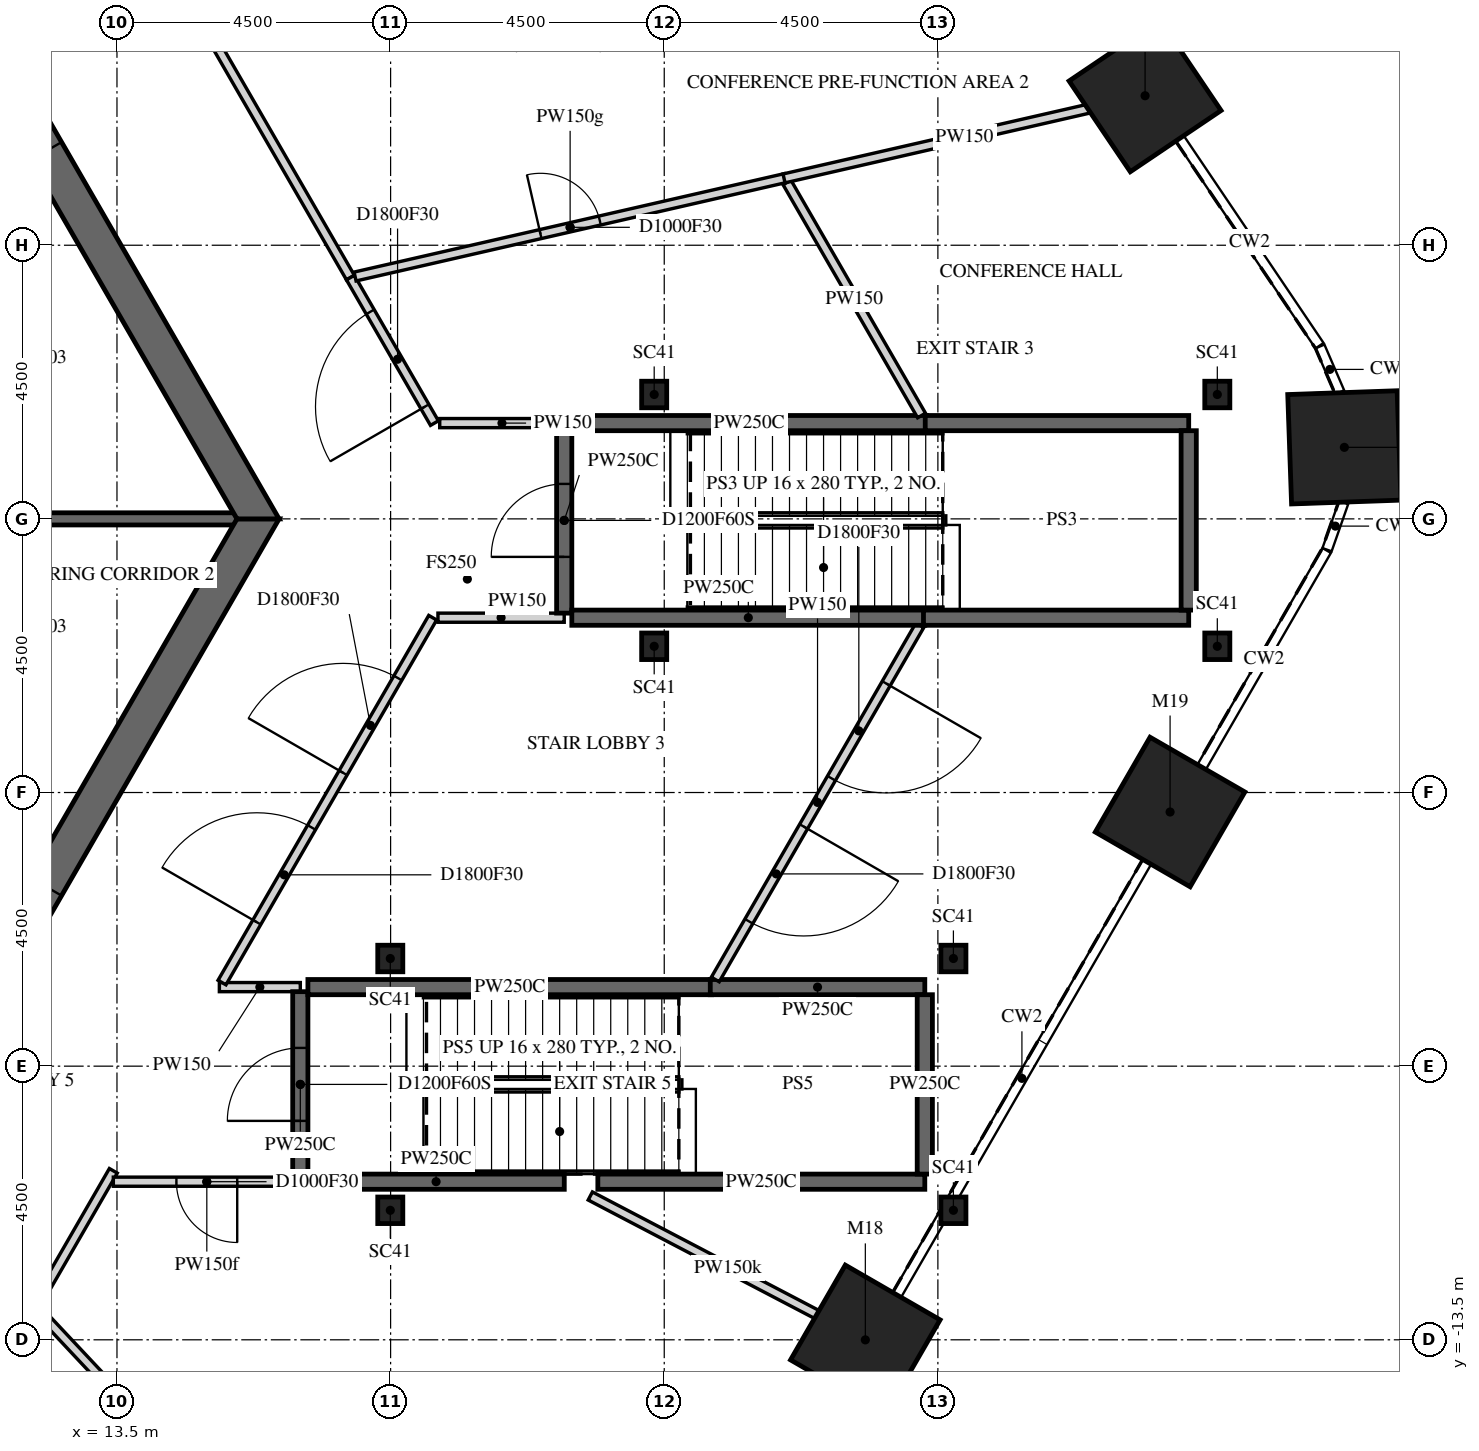
"""IFC4 building model, lengths in metres.
Left out: names, types, materials, properties, quantities, classifications, styles, units other than length and angle.
Written with IfcOpenShell. Run it as: python <this file> out.ifc"""

import sys

from ifc_helpers import new_model, si_unit, direction, frame, frame_2d, origin, origin_2d, place, context, subcontext, project, spatial, polyline, rectangle, i_section, outline, extrude, element, fill, save


model = new_model("IFC4")
c1 = context("Model", 3, precision=1e-05, world=origin(), true_north=direction((0.0, 1.0)))
c2 = subcontext(c1, "Body", "Model", "MODEL_VIEW")
j1 = project(units=[si_unit("LENGTHUNIT", "METRE"), si_unit("PLANEANGLEUNIT", "RADIAN")], contexts=[c1])
p1 = place(None, origin())
s1 = spatial("IfcSite", under=j1, at=p1, CompositionType="ELEMENT")
p2 = place(p1, origin())
s2 = spatial("IfcBuilding", under=s1, at=p2, CompositionType="ELEMENT")
p3 = place(p2, frame((0.0, 0.0, 20.5)))
s3 = spatial("IfcBuildingStorey", under=s2, at=p3, CompositionType="ELEMENT", Elevation=20.5)
for number, where, z_axis, x_axis in (
    (1, (25.807, -13.501, -0.25), (0.0, 0.0, 1.0), (-0.5, -0.866, 0.0)),
    (2, (30.819, -4.82, -0.25), (0.0, 0.0, 1.0), (-0.5, -0.866, 0.0)),
    (3, (33.685, 1.176, -0.25), (0.0, 0.0, 1.0), (0.035, -0.999, 0.0)),
    (4, (30.407, 6.958, -0.25), (0.0, 0.0, 1.0), (0.559, -0.829, 0.0)),
):
    element("IfcColumn", number, at=place(p3, frame(where, z_axis=z_axis, x_axis=x_axis)), inside=s3, PredefinedType="COLUMN", context=c2, shape_type="SweptSolid", body=[
        extrude(rectangle(XDim=1.8, YDim=1.8, at=origin_2d()), origin(), (0.0, 0.0, 1.0), 5.5),
    ])
for number, where, z_axis, x_axis in (
    (5, (31.595, 2.045, -0.25), (0.0, 0.0, 1.0), (1.0, 0.0, 0.0)),
    (6, (31.595, -2.095, -0.25), (0.0, 0.0, 1.0), (1.0, 0.0, 0.0)),
    (7, (22.335, -2.095, -0.25), (0.0, 0.0, 1.0), (1.0, 0.0, 0.0)),
    (8, (22.335, 2.045, -0.25), (0.0, 0.0, 1.0), (1.0, 0.0, 0.0)),
    (9, (27.255, -7.23, -0.25), (0.0, 0.0, 1.0), (1.0, 0.0, 0.0)),
    (10, (27.255, -11.37, -0.25), (0.0, 0.0, 1.0), (1.0, 0.0, 0.0)),
    (11, (17.995, -11.37, -0.25), (0.0, 0.0, 1.0), (1.0, 0.0, 0.0)),
    (12, (17.995, -7.23, -0.25), (0.0, 0.0, 1.0), (1.0, 0.0, 0.0)),
):
    element("IfcColumn", number, at=place(p3, frame(where, z_axis=z_axis, x_axis=x_axis)), inside=s3, PredefinedType="COLUMN", context=c2, shape_type="SweptSolid", body=[
        extrude(i_section(OverallWidth=0.412, OverallDepth=0.437, WebThickness=0.036, FlangeThickness=0.058, FilletRadius=0.015, at=origin_2d()), origin(), (0.0, 0.0, 1.0), 5.5),
    ])
p4 = place(p3, frame((7.91, -13.7, -0.25), z_axis=(0.0, 0.0, 1.0), x_axis=(0.499999880136, 0.866025472988, 0.0)))
e13 = element("IfcWall", 13, at=p4, inside=s3, PredefinedType="SHEAR", context=c2, shape_type="SweptSolid", body=[
    extrude(outline(polyline([(-0.173, -0.3), (15.993, -0.3), (15.646, 0.3), (0.173, 0.3), (-0.173, -0.3)])), origin(), (0.0, 0.0, 1.0), 5.5),
])
p5 = place(p4, frame((7.039, 0.0, 0.25)))
e14 = element("IfcOpeningElement", 14, at=p5, cuts=e13, PredefinedType="OPENING", context=c2, shape_type="SweptSolid", body=[
    extrude(rectangle(XDim=1.8, YDim=2.4, at=frame_2d((0.9, 1.2))), frame((0.0, 0.31, 0.0), z_axis=(0.0, -1.0, 0.0), x_axis=(1.0, 0.0, 0.0)), (0.0, 0.0, 1.0), 0.62),
])
p6 = place(p3, frame((15.819, 0.0, -0.25), z_axis=(0.0, 0.0, 1.0), x_axis=(-0.499999880136, 0.866025472988, 0.0)))
e15 = element("IfcWall", 15, at=p6, inside=s3, PredefinedType="SHEAR", context=c2, shape_type="SweptSolid", body=[
    extrude(outline(polyline([(-0.173, -0.3), (15.993, -0.3), (15.646, 0.3), (0.173, 0.3), (-0.173, -0.3)])), origin(), (0.0, 0.0, 1.0), 5.5),
])
p7 = place(p6, frame((6.981, 0.0, 0.25)))
e16 = element("IfcOpeningElement", 16, at=p7, cuts=e15, PredefinedType="OPENING", context=c2, shape_type="SweptSolid", body=[
    extrude(rectangle(XDim=1.8, YDim=2.4, at=frame_2d((0.9, 1.2))), frame((0.0, 0.31, 0.0), z_axis=(0.0, -1.0, 0.0), x_axis=(1.0, 0.0, 0.0)), (0.0, 0.0, 1.0), 0.62),
])
p8 = place(p3, frame((11.547, 0.0, -0.25), z_axis=(0.0, 0.0, 1.0), x_axis=(1.0, 0.0, 0.0)))
e17 = element("IfcWall", 17, at=p8, inside=s3, PredefinedType="SHEAR", context=c2, shape_type="SweptSolid", body=[
    extrude(rectangle(XDim=3.926, YDim=0.2, at=frame_2d((1.963, 0.0))), origin(), (0.0, 0.0, 1.0), 5.5),
])
p9 = place(p3, frame((12.148, -12.959, 0.0), z_axis=(0.0, 0.0, 1.0), x_axis=(0.499959617396, 0.866048717436, 0.0)))
e18 = element("IfcWall", 18, at=p9, inside=s3, PredefinedType="PARTITIONING", context=c2, shape_type="SweptSolid", body=[
    extrude(rectangle(XDim=2.584, YDim=0.15, at=frame_2d((1.292, 0.0))), origin(), (0.0, 0.0, 1.0), 5.25),
])
p10 = place(p3, frame((15.184, -7.7, 0.0), z_axis=(0.0, 0.0, 1.0), x_axis=(1.0, 0.0, 0.0)))
e19 = element("IfcWall", 19, at=p10, inside=s3, PredefinedType="PARTITIONING", context=c2, shape_type="SweptSolid", body=[
    extrude(rectangle(XDim=1.331, YDim=0.15, at=frame_2d((0.666, 0.0))), origin(), (0.0, 0.0, 1.0), 5.25),
])
p11 = place(p3, frame((15.227, -7.625, 0.0), z_axis=(0.0, 0.0, 1.0), x_axis=(0.500053906551, 0.865994278585, 0.0)))
e20 = element("IfcWall", 20, at=p11, inside=s3, PredefinedType="PARTITIONING", context=c2, shape_type="SweptSolid", body=[
    extrude(rectangle(XDim=6.928, YDim=0.15, at=frame_2d((3.464, 0.0))), origin(), (0.0, 0.0, 1.0), 5.25),
])
p12 = place(p11, frame((1.146, 0.0, 0.0)))
e21 = element("IfcOpeningElement", 21, at=p12, cuts=e20, PredefinedType="OPENING", context=c2, shape_type="SweptSolid", body=[
    extrude(rectangle(XDim=1.8, YDim=2.1, at=frame_2d((0.9, 1.05))), frame((0.0, 0.085, 0.0), z_axis=(0.0, -1.0, 0.0), x_axis=(1.0, 0.0, 0.0)), (0.0, 0.0, 1.0), 0.17),
])
p13 = place(p11, frame((3.983, 0.0, 0.0)))
e22 = element("IfcOpeningElement", 22, at=p13, cuts=e20, PredefinedType="OPENING", context=c2, shape_type="SweptSolid", body=[
    extrude(rectangle(XDim=1.8, YDim=2.1, at=frame_2d((0.9, 1.05))), frame((0.0, 0.085, 0.0), z_axis=(0.0, -1.0, 0.0), x_axis=(1.0, 0.0, 0.0)), (0.0, 0.0, 1.0), 0.17),
])
p14 = place(p3, frame((16.515, -10.9, 0.0), z_axis=(0.0, 0.0, 1.0), x_axis=(-1.0, 0.0, 0.0)))
e23 = element("IfcWall", 23, at=p14, inside=s3, PredefinedType="PARTITIONING", context=c2, shape_type="SweptSolid", body=[
    extrude(rectangle(XDim=3.075, YDim=0.15, at=frame_2d((1.538, 0.0))), origin(), (0.0, 0.0, 1.0), 4.496),
])
p15 = place(p14, frame((1.038, 0.0, 0.0)))
e24 = element("IfcOpeningElement", 24, at=p15, cuts=e23, PredefinedType="OPENING", context=c2, shape_type="SweptSolid", body=[
    extrude(rectangle(XDim=1.0, YDim=2.1, at=frame_2d((0.5, 1.05))), frame((0.0, 0.085, 0.0), z_axis=(0.0, -1.0, 0.0), x_axis=(1.0, 0.0, 0.0)), (0.0, 0.0, 1.0), 0.17),
])
p16 = place(p3, frame((16.515, -10.825, 0.0), z_axis=(0.0, 0.0, 1.0), x_axis=(0.0, 1.0, 0.0)))
e25 = element("IfcWall", 25, at=p16, inside=s3, PredefinedType="PARTITIONING", context=c2, shape_type="SweptSolid", body=[
    extrude(rectangle(XDim=3.05, YDim=0.25, at=frame_2d((1.525, 0.0))), origin(), (0.0, 0.0, 1.0), 5.25),
])
p17 = place(p16, frame((0.925, 0.0, 0.0)))
e26 = element("IfcOpeningElement", 26, at=p17, cuts=e25, PredefinedType="OPENING", context=c2, shape_type="SweptSolid", body=[
    extrude(rectangle(XDim=1.2, YDim=2.1, at=frame_2d((0.6, 1.05))), frame((0.0, 0.135, 0.0), z_axis=(0.0, -1.0, 0.0), x_axis=(1.0, 0.0, 0.0)), (0.0, 0.0, 1.0), 0.27),
])
p18 = place(p3, frame((16.64, -7.7, 0.0), z_axis=(0.0, 0.0, 1.0), x_axis=(1.0, 0.0, 0.0)))
e27 = element("IfcWall", 27, at=p18, inside=s3, PredefinedType="PARTITIONING", context=c2, shape_type="SweptSolid", body=[
    extrude(rectangle(XDim=6.639, YDim=0.25, at=frame_2d((3.32, 0.0))), origin(), (0.0, 0.0, 1.0), 5.25),
])
p19 = place(p3, frame((17.339, 3.968, 0.0), z_axis=(0.0, 0.0, 1.0), x_axis=(-0.499952654668, 0.866052736899, 0.0)))
e28 = element("IfcWall", 28, at=p19, inside=s3, PredefinedType="PARTITIONING", context=c2, shape_type="SweptSolid", body=[
    extrude(rectangle(XDim=5.233, YDim=0.15, at=frame_2d((2.616, 0.0))), origin(), (0.0, 0.0, 1.0), 5.25),
])
p20 = place(p3, frame((18.721, 1.575, 0.0), z_axis=(0.0, 0.0, 1.0), x_axis=(-0.500053847239, 0.865994312834, 0.0)))
e29 = element("IfcWall", 29, at=p20, inside=s3, PredefinedType="PARTITIONING", context=c2, shape_type="SweptSolid", body=[
    extrude(rectangle(XDim=2.763, YDim=0.15, at=frame_2d((1.382, 0.0))), origin(), (0.0, 0.0, 1.0), 5.25),
])
p21 = place(p20, frame((0.313, 0.0, 0.0)))
e30 = element("IfcOpeningElement", 30, at=p21, cuts=e29, PredefinedType="OPENING", context=c2, shape_type="SweptSolid", body=[
    extrude(rectangle(XDim=1.8, YDim=2.1, at=frame_2d((0.9, 1.05))), frame((0.0, 0.085, 0.0), z_axis=(0.0, -1.0, 0.0), x_axis=(1.0, 0.0, 0.0)), (0.0, 0.0, 1.0), 0.17),
])
p22 = place(p3, frame((18.808, 1.575, 0.0), z_axis=(0.0, 0.0, 1.0), x_axis=(1.0, 0.0, 0.0)))
e31 = element("IfcWall", 31, at=p22, inside=s3, PredefinedType="PARTITIONING", context=c2, shape_type="SweptSolid", body=[
    extrude(rectangle(XDim=2.047, YDim=0.15, at=frame_2d((1.024, 0.0))), origin(), (0.0, 0.0, 1.0), 5.25),
])
p23 = place(p3, frame((20.795, -22.182, 0.0), z_axis=(0.0, 0.0, 1.0), x_axis=(-0.683955995382, 0.729523266511, 0.0)))
e32 = element("IfcWall", 32, at=p23, inside=s3, PredefinedType="PARTITIONING", context=c2, shape_type="SweptSolid", body=[
    extrude(rectangle(XDim=12.564, YDim=0.15, at=frame_2d((6.282, 0.0))), origin(), (0.0, 0.0, 1.0), 4.496),
])
p24 = place(p3, frame((20.855, -1.625, 0.0), z_axis=(0.0, 0.0, 1.0), x_axis=(-1.0, 0.0, 0.0)))
e33 = element("IfcWall", 33, at=p24, inside=s3, PredefinedType="PARTITIONING", context=c2, shape_type="SweptSolid", body=[
    extrude(rectangle(XDim=2.076, YDim=0.15, at=frame_2d((1.038, 0.0))), origin(), (0.0, 0.0, 1.0), 5.25),
])
p25 = place(p3, frame((20.855, -1.55, 0.0), z_axis=(0.0, 0.0, 1.0), x_axis=(0.0, 1.0, 0.0)))
e34 = element("IfcWall", 34, at=p25, inside=s3, PredefinedType="PARTITIONING", context=c2, shape_type="SweptSolid", body=[
    extrude(rectangle(XDim=3.05, YDim=0.25, at=frame_2d((1.525, 0.0))), origin(), (0.0, 0.0, 1.0), 5.25),
])
p26 = place(p25, frame((0.925, 0.0, 0.0)))
e35 = element("IfcOpeningElement", 35, at=p26, cuts=e34, PredefinedType="OPENING", context=c2, shape_type="SweptSolid", body=[
    extrude(rectangle(XDim=1.2, YDim=2.1, at=frame_2d((0.6, 1.05))), frame((0.0, 0.135, 0.0), z_axis=(0.0, -1.0, 0.0), x_axis=(1.0, 0.0, 0.0)), (0.0, 0.0, 1.0), 0.27),
])
p27 = place(p3, frame((20.98, 1.575, 0.0), z_axis=(0.0, 0.0, 1.0), x_axis=(1.0, 0.0, 0.0)))
e36 = element("IfcWall", 36, at=p27, inside=s3, PredefinedType="PARTITIONING", context=c2, shape_type="SweptSolid", body=[
    extrude(rectangle(XDim=5.834, YDim=0.25, at=frame_2d((2.917, 0.0))), origin(), (0.0, 0.0, 1.0), 5.25),
])
p28 = place(p3, frame((20.856, -10.9, 0.0), z_axis=(0.0, 0.0, 1.0), x_axis=(-1.0, 0.0, 0.0)))
e37 = element("IfcWall", 37, at=p28, inside=s3, PredefinedType="PARTITIONING", context=c2, shape_type="SweptSolid", body=[
    extrude(rectangle(XDim=4.216, YDim=0.25, at=frame_2d((2.108, 0.0))), origin(), (0.0, 0.0, 1.0), 5.25),
])
p29 = place(p3, frame((23.257, -7.7, 0.0), z_axis=(0.0, 0.0, 1.0), x_axis=(1.0, 0.0, 0.0)))
e38 = element("IfcWall", 38, at=p29, inside=s3, PredefinedType="PARTITIONING", context=c2, shape_type="SweptSolid", body=[
    extrude(rectangle(XDim=3.528, YDim=0.25, at=frame_2d((1.764, 0.0))), origin(), (0.0, 0.0, 1.0), 5.25),
])
p30 = place(p3, frame((24.518, 5.534, 0.0), z_axis=(0.0, 0.0, 1.0), x_axis=(0.500012051057, -0.866018445991, 0.0)))
e39 = element("IfcWall", 39, at=p30, inside=s3, PredefinedType="PARTITIONING", context=c2, shape_type="SweptSolid", body=[
    extrude(rectangle(XDim=4.427, YDim=0.15, at=frame_2d((2.214, 0.0))), origin(), (0.0, 0.0, 1.0), 5.25),
])
p31 = place(p3, frame((17.416, 3.986, 0.0), z_axis=(0.0, 0.0, 1.0), x_axis=(0.974810247243, 0.223035830911, 0.0)))
e40 = element("IfcWall", 40, at=p31, inside=s3, PredefinedType="PARTITIONING", context=c2, shape_type="SweptSolid", body=[
    extrude(rectangle(XDim=7.256, YDim=0.15, at=frame_2d((3.628, 0.0))), origin(), (0.0, 0.0, 1.0), 4.488),
])
p32 = place(p31, frame((3.128, 0.0, 0.0)))
e41 = element("IfcOpeningElement", 41, at=p32, cuts=e40, PredefinedType="OPENING", context=c2, shape_type="SweptSolid", body=[
    extrude(rectangle(XDim=1.0, YDim=2.1, at=frame_2d((0.5, 1.05))), frame((0.0, 0.085, 0.0), z_axis=(0.0, -1.0, 0.0), x_axis=(1.0, 0.0, 0.0)), (0.0, 0.0, 1.0), 0.17),
])
p33 = place(p3, frame((25.807, -13.501, 0.0), z_axis=(0.0, 0.0, 1.0), x_axis=(-0.886088844059, 0.463515437104, 0.0)))
e42 = element("IfcWall", 42, at=p33, inside=s3, PredefinedType="PARTITIONING", context=c2, shape_type="SweptSolid", body=[
    extrude(rectangle(XDim=5.104, YDim=0.15, at=frame_2d((2.552, 0.0))), origin(), (0.0, 0.0, 1.0), 4.323),
])
p34 = place(p3, frame((26.703, -1.75, 0.0), z_axis=(0.0, 0.0, 1.0), x_axis=(-0.500081661045, -0.865978251624, 0.0)))
e43 = element("IfcWall", 43, at=p34, inside=s3, PredefinedType="PARTITIONING", context=c2, shape_type="SweptSolid", body=[
    extrude(rectangle(XDim=6.727, YDim=0.15, at=frame_2d((3.363, 0.0))), origin(), (0.0, 0.0, 1.0), 5.25),
])
p35 = place(p34, frame((1.105, 0.0, 0.0)))
e44 = element("IfcOpeningElement", 44, at=p35, cuts=e43, PredefinedType="OPENING", context=c2, shape_type="SweptSolid", body=[
    extrude(rectangle(XDim=1.8, YDim=2.1, at=frame_2d((0.9, 1.05))), frame((0.0, 0.085, 0.0), z_axis=(0.0, -1.0, 0.0), x_axis=(1.0, 0.0, 0.0)), (0.0, 0.0, 1.0), 0.17),
])
p36 = place(p34, frame((3.821, 0.0, 0.0)))
e45 = element("IfcOpeningElement", 45, at=p36, cuts=e43, PredefinedType="OPENING", context=c2, shape_type="SweptSolid", body=[
    extrude(rectangle(XDim=1.8, YDim=2.1, at=frame_2d((0.9, 1.05))), frame((0.0, 0.085, 0.0), z_axis=(0.0, -1.0, 0.0), x_axis=(1.0, 0.0, 0.0)), (0.0, 0.0, 1.0), 0.17),
])
p37 = place(p3, frame((26.785, -10.9, 0.0), z_axis=(0.0, 0.0, 1.0), x_axis=(-1.0, 0.0, 0.0)))
e46 = element("IfcWall", 46, at=p37, inside=s3, PredefinedType="PARTITIONING", context=c2, shape_type="SweptSolid", body=[
    extrude(rectangle(XDim=5.377, YDim=0.25, at=frame_2d((2.688, 0.0))), origin(), (0.0, 0.0, 1.0), 5.25),
])
p38 = place(p3, frame((26.785, -7.825, 0.0), z_axis=(0.0, 0.0, 1.0), x_axis=(0.0, -1.0, 0.0)))
e47 = element("IfcWall", 47, at=p38, inside=s3, PredefinedType="PARTITIONING", context=c2, shape_type="SweptSolid", body=[
    extrude(rectangle(XDim=2.95, YDim=0.25, at=frame_2d((1.475, 0.0))), origin(), (0.0, 0.0, 1.0), 5.25),
])
p39 = place(p3, frame((26.785, -1.625, 0.0), z_axis=(0.0, 0.0, 1.0), x_axis=(-1.0, 0.0, 0.0)))
e48 = element("IfcWall", 48, at=p39, inside=s3, PredefinedType="PARTITIONING", context=c2, shape_type="SweptSolid", body=[
    extrude(rectangle(XDim=5.805, YDim=0.25, at=frame_2d((2.902, 0.0))), origin(), (0.0, 0.0, 1.0), 5.25),
])
p40 = place(p3, frame((26.792, 1.575, 0.0), z_axis=(0.0, 0.0, 1.0), x_axis=(1.0, 0.0, 0.0)))
e49 = element("IfcWall", 49, at=p40, inside=s3, PredefinedType="PARTITIONING", context=c2, shape_type="SweptSolid", body=[
    extrude(rectangle(XDim=4.333, YDim=0.25, at=frame_2d((2.167, 0.0))), origin(), (0.0, 0.0, 1.0), 5.25),
])
p41 = place(p3, frame((30.407, 6.958, 0.0), z_axis=(0.0, 0.0, 1.0), x_axis=(-0.97479228721, -0.223114313291, 0.0)))
e50 = element("IfcWall", 50, at=p41, inside=s3, PredefinedType="PARTITIONING", context=c2, shape_type="SweptSolid", body=[
    extrude(rectangle(XDim=6.091, YDim=0.15, at=frame_2d((3.045, 0.0))), origin(), (0.0, 0.0, 1.0), 5.25),
])
p42 = place(p3, frame((31.125, -1.625, 0.0), z_axis=(0.0, 0.0, 1.0), x_axis=(-1.0, 0.0, 0.0)))
e51 = element("IfcWall", 51, at=p42, inside=s3, PredefinedType="PARTITIONING", context=c2, shape_type="SweptSolid", body=[
    extrude(rectangle(XDim=4.362, YDim=0.25, at=frame_2d((2.181, 0.0))), origin(), (0.0, 0.0, 1.0), 5.25),
])
p43 = place(p3, frame((31.125, 1.45, 0.0), z_axis=(0.0, 0.0, 1.0), x_axis=(0.0, -1.0, 0.0)))
e52 = element("IfcWall", 52, at=p43, inside=s3, PredefinedType="PARTITIONING", context=c2, shape_type="SweptSolid", body=[
    extrude(rectangle(XDim=2.95, YDim=0.25, at=frame_2d((1.475, 0.0))), origin(), (0.0, 0.0, 1.0), 5.25),
])
p44 = place(p12, origin())
e53 = element("IfcDoor", 53, at=p44, inside=s3, OperationType="DOUBLE_DOOR_SINGLE_SWING", PredefinedType="DOOR", context=c2, shape_type="SweptSolid", body=[
    extrude(rectangle(XDim=1.8, YDim=2.1, at=frame_2d((0.9, 1.05))), frame((0.0, 0.025, 0.0), z_axis=(0.0, -1.0, 0.0), x_axis=(1.0, 0.0, 0.0)), (0.0, 0.0, 1.0), 0.05),
])
fill(e21, e53)
p45 = place(p13, origin())
e54 = element("IfcDoor", 54, at=p45, inside=s3, OperationType="DOUBLE_DOOR_SINGLE_SWING", PredefinedType="DOOR", context=c2, shape_type="SweptSolid", body=[
    extrude(rectangle(XDim=1.8, YDim=2.1, at=frame_2d((0.9, 1.05))), frame((0.0, 0.025, 0.0), z_axis=(0.0, -1.0, 0.0), x_axis=(1.0, 0.0, 0.0)), (0.0, 0.0, 1.0), 0.05),
])
fill(e22, e54)
p46 = place(p15, origin())
e55 = element("IfcDoor", 55, at=p46, inside=s3, OperationType="SINGLE_SWING_LEFT", PredefinedType="DOOR", context=c2, shape_type="SweptSolid", body=[
    extrude(rectangle(XDim=1.0, YDim=2.1, at=frame_2d((0.5, 1.05))), frame((0.0, 0.025, 0.0), z_axis=(0.0, -1.0, 0.0), x_axis=(1.0, 0.0, 0.0)), (0.0, 0.0, 1.0), 0.05),
])
fill(e24, e55)
p47 = place(p17, origin())
e56 = element("IfcDoor", 56, at=p47, inside=s3, OperationType="SINGLE_SWING_RIGHT", PredefinedType="DOOR", context=c2, shape_type="SweptSolid", body=[
    extrude(rectangle(XDim=1.2, YDim=2.1, at=frame_2d((0.6, 1.05))), frame((0.0, 0.025, 0.0), z_axis=(0.0, -1.0, 0.0), x_axis=(1.0, 0.0, 0.0)), (0.0, 0.0, 1.0), 0.05),
])
fill(e26, e56)
p48 = place(p21, origin())
e57 = element("IfcDoor", 57, at=p48, inside=s3, OperationType="DOUBLE_DOOR_SINGLE_SWING", PredefinedType="DOOR", context=c2, shape_type="SweptSolid", body=[
    extrude(rectangle(XDim=1.8, YDim=2.1, at=frame_2d((0.9, 1.05))), frame((0.0, 0.025, 0.0), z_axis=(0.0, -1.0, 0.0), x_axis=(1.0, 0.0, 0.0)), (0.0, 0.0, 1.0), 0.05),
])
fill(e30, e57)
p49 = place(p26, origin())
e58 = element("IfcDoor", 58, at=p49, inside=s3, OperationType="SINGLE_SWING_RIGHT", PredefinedType="DOOR", context=c2, shape_type="SweptSolid", body=[
    extrude(rectangle(XDim=1.2, YDim=2.1, at=frame_2d((0.6, 1.05))), frame((0.0, 0.025, 0.0), z_axis=(0.0, -1.0, 0.0), x_axis=(1.0, 0.0, 0.0)), (0.0, 0.0, 1.0), 0.05),
])
fill(e35, e58)
p50 = place(p32, origin())
e59 = element("IfcDoor", 59, at=p50, inside=s3, OperationType="SINGLE_SWING_LEFT", PredefinedType="DOOR", context=c2, shape_type="SweptSolid", body=[
    extrude(rectangle(XDim=1.0, YDim=2.1, at=frame_2d((0.5, 1.05))), frame((0.0, 0.025, 0.0), z_axis=(0.0, -1.0, 0.0), x_axis=(1.0, 0.0, 0.0)), (0.0, 0.0, 1.0), 0.05),
])
fill(e41, e59)
p51 = place(p35, origin())
e60 = element("IfcDoor", 60, at=p51, inside=s3, OperationType="DOUBLE_DOOR_SINGLE_SWING", PredefinedType="DOOR", context=c2, shape_type="SweptSolid", body=[
    extrude(rectangle(XDim=1.8, YDim=2.1, at=frame_2d((0.9, 1.05))), frame((0.0, 0.025, 0.0), z_axis=(0.0, -1.0, 0.0), x_axis=(1.0, 0.0, 0.0)), (0.0, 0.0, 1.0), 0.05),
])
fill(e44, e60)
p52 = place(p36, origin())
e61 = element("IfcDoor", 61, at=p52, inside=s3, OperationType="DOUBLE_DOOR_SINGLE_SWING", PredefinedType="DOOR", context=c2, shape_type="SweptSolid", body=[
    extrude(rectangle(XDim=1.8, YDim=2.1, at=frame_2d((0.9, 1.05))), frame((0.0, 0.025, 0.0), z_axis=(0.0, -1.0, 0.0), x_axis=(1.0, 0.0, 0.0)), (0.0, 0.0, 1.0), 0.05),
])
fill(e45, e61)
save(model, sys.argv[1])
